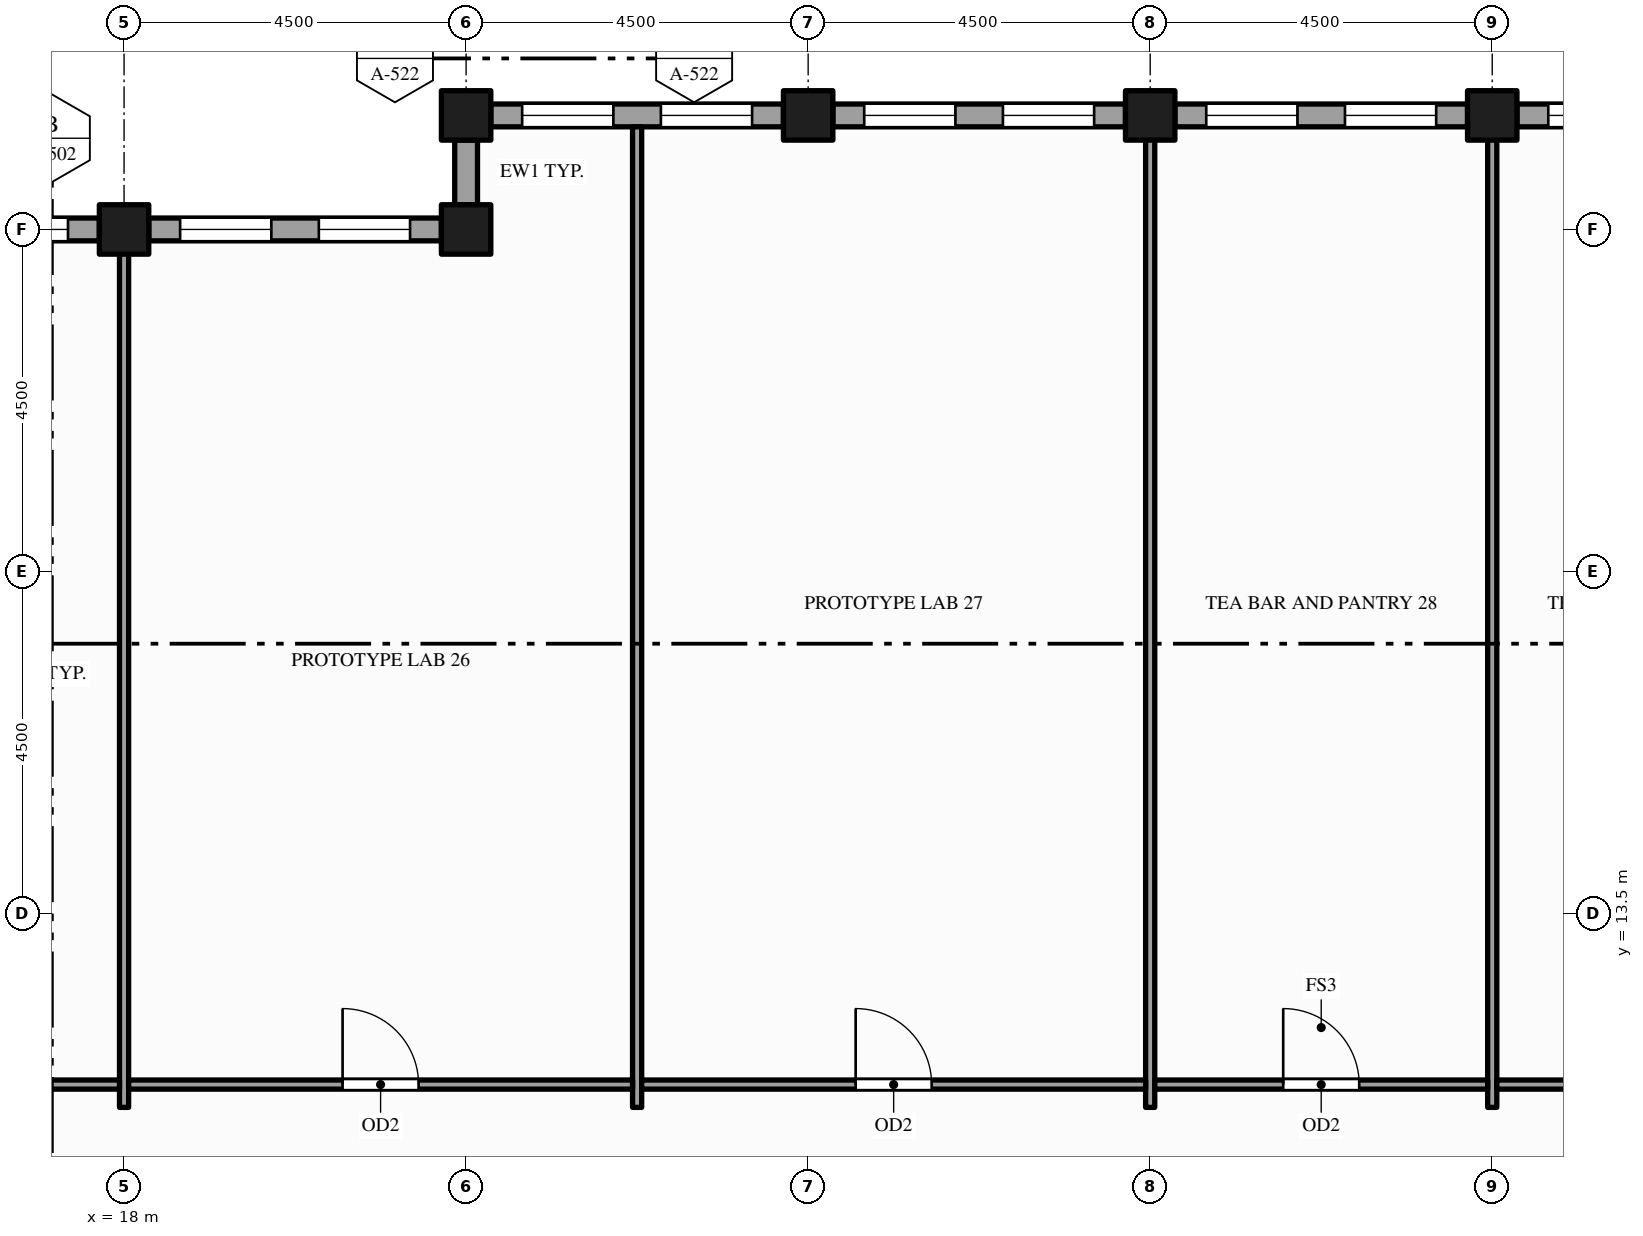
"""IFC4 building model, lengths in metres.
Left out: names, types, materials, properties, quantities, classifications, styles, units other than length and angle.
Written with IfcOpenShell. Run it as: python <this file> out.ifc"""

import sys

from ifc_helpers import new_model, si_unit, direction, frame, frame_2d, origin, origin_2d, place, context, subcontext, project, spatial, rectangle, hollow_rectangle, extrude, element, fill, save


model = new_model("IFC4")
c1 = context("Model", 3, precision=1e-05, world=origin(), true_north=direction((0.0, 1.0)))
c2 = subcontext(c1, "Body", "Model", "MODEL_VIEW")
j1 = project(units=[si_unit("LENGTHUNIT", "METRE"), si_unit("PLANEANGLEUNIT", "RADIAN")], contexts=[c1])
p1 = place(None, origin())
s1 = spatial("IfcSite", under=j1, at=p1, CompositionType="ELEMENT")
p2 = place(p1, origin())
s2 = spatial("IfcBuilding", under=s1, at=p2, CompositionType="ELEMENT")
p3 = place(p2, frame((0.0, 0.0, 249.0)))
s3 = spatial("IfcBuildingStorey", under=s2, at=p3, CompositionType="ELEMENT", Elevation=249.0)
for number, where, z_axis, x_axis in (
    (1, (18.0, 22.5, -0.15), (0.0, 0.0, 1.0), (1.0, 0.0, 0.0)),
    (2, (22.5, 22.5, -0.15), (0.0, 0.0, 1.0), (1.0, 0.0, 0.0)),
    (3, (22.5, 24.0, -0.15), (0.0, 0.0, 1.0), (1.0, 0.0, 0.0)),
    (4, (27.0, 24.0, -0.15), (0.0, 0.0, 1.0), (1.0, 0.0, 0.0)),
    (5, (31.5, 24.0, -0.15), (0.0, 0.0, 1.0), (1.0, 0.0, 0.0)),
    (6, (36.0, 24.0, -0.15), (0.0, 0.0, 1.0), (1.0, 0.0, 0.0)),
):
    element("IfcColumn", number, at=place(p3, frame(where, z_axis=z_axis, x_axis=x_axis)), inside=s3, PredefinedType="COLUMN", context=c2, shape_type="SweptSolid", body=[
        extrude(hollow_rectangle(XDim=0.65, YDim=0.65, WallThickness=0.032, at=origin_2d()), origin(), (0.0, 0.0, 1.0), 4.0),
    ])
p4 = place(p3, frame((40.175, 24.0, 0.0), z_axis=(0.0, 0.0, 1.0), x_axis=(-1.0, 0.0, 0.0)))
e7 = element("IfcWall", 7, at=p4, inside=s3, PredefinedType="STANDARD", context=c2, shape_type="SweptSolid", body=[
    extrude(rectangle(XDim=3.85, YDim=0.3, at=frame_2d((1.925, 0.0))), origin(), (0.0, 0.0, 1.0), 2.87),
])
p5 = place(p4, frame((0.413, 0.0, 0.9)))
e8 = element("IfcOpeningElement", 8, at=p5, cuts=e7, PredefinedType="OPENING", context=c2, shape_type="SweptSolid", body=[
    extrude(rectangle(XDim=1.2, YDim=1.75, at=frame_2d((0.6, 0.875))), frame((0.0, 0.16, 0.0), z_axis=(0.0, -1.0, 0.0), x_axis=(1.0, 0.0, 0.0)), (0.0, 0.0, 1.0), 0.32),
])
p6 = place(p4, frame((2.238, 0.0, 0.9)))
e9 = element("IfcOpeningElement", 9, at=p6, cuts=e7, PredefinedType="OPENING", context=c2, shape_type="SweptSolid", body=[
    extrude(rectangle(XDim=1.2, YDim=1.75, at=frame_2d((0.6, 0.875))), frame((0.0, 0.16, 0.0), z_axis=(0.0, -1.0, 0.0), x_axis=(1.0, 0.0, 0.0)), (0.0, 0.0, 1.0), 0.32),
])
p7 = place(p3, frame((35.675, 24.0, 0.0), z_axis=(0.0, 0.0, 1.0), x_axis=(-1.0, 0.0, 0.0)))
e10 = element("IfcWall", 10, at=p7, inside=s3, PredefinedType="STANDARD", context=c2, shape_type="SweptSolid", body=[
    extrude(rectangle(XDim=3.85, YDim=0.3, at=frame_2d((1.925, 0.0))), origin(), (0.0, 0.0, 1.0), 2.87),
])
p8 = place(p7, frame((0.413, 0.0, 0.9)))
e11 = element("IfcOpeningElement", 11, at=p8, cuts=e10, PredefinedType="OPENING", context=c2, shape_type="SweptSolid", body=[
    extrude(rectangle(XDim=1.2, YDim=1.75, at=frame_2d((0.6, 0.875))), frame((0.0, 0.16, 0.0), z_axis=(0.0, -1.0, 0.0), x_axis=(1.0, 0.0, 0.0)), (0.0, 0.0, 1.0), 0.32),
])
p9 = place(p7, frame((2.238, 0.0, 0.9)))
e12 = element("IfcOpeningElement", 12, at=p9, cuts=e10, PredefinedType="OPENING", context=c2, shape_type="SweptSolid", body=[
    extrude(rectangle(XDim=1.2, YDim=1.75, at=frame_2d((0.6, 0.875))), frame((0.0, 0.16, 0.0), z_axis=(0.0, -1.0, 0.0), x_axis=(1.0, 0.0, 0.0)), (0.0, 0.0, 1.0), 0.32),
])
p10 = place(p3, frame((31.175, 24.0, 0.0), z_axis=(0.0, 0.0, 1.0), x_axis=(-1.0, 0.0, 0.0)))
e13 = element("IfcWall", 13, at=p10, inside=s3, PredefinedType="STANDARD", context=c2, shape_type="SweptSolid", body=[
    extrude(rectangle(XDim=3.85, YDim=0.3, at=frame_2d((1.925, 0.0))), origin(), (0.0, 0.0, 1.0), 2.87),
])
p11 = place(p10, frame((0.413, 0.0, 0.9)))
e14 = element("IfcOpeningElement", 14, at=p11, cuts=e13, PredefinedType="OPENING", context=c2, shape_type="SweptSolid", body=[
    extrude(rectangle(XDim=1.2, YDim=1.75, at=frame_2d((0.6, 0.875))), frame((0.0, 0.16, 0.0), z_axis=(0.0, -1.0, 0.0), x_axis=(1.0, 0.0, 0.0)), (0.0, 0.0, 1.0), 0.32),
])
p12 = place(p10, frame((2.238, 0.0, 0.9)))
e15 = element("IfcOpeningElement", 15, at=p12, cuts=e13, PredefinedType="OPENING", context=c2, shape_type="SweptSolid", body=[
    extrude(rectangle(XDim=1.2, YDim=1.75, at=frame_2d((0.6, 0.875))), frame((0.0, 0.16, 0.0), z_axis=(0.0, -1.0, 0.0), x_axis=(1.0, 0.0, 0.0)), (0.0, 0.0, 1.0), 0.32),
])
p13 = place(p3, frame((26.675, 24.0, 0.0), z_axis=(0.0, 0.0, 1.0), x_axis=(-1.0, 0.0, 0.0)))
e16 = element("IfcWall", 16, at=p13, inside=s3, PredefinedType="STANDARD", context=c2, shape_type="SweptSolid", body=[
    extrude(rectangle(XDim=3.85, YDim=0.3, at=frame_2d((1.925, 0.0))), origin(), (0.0, 0.0, 1.0), 2.87),
])
p14 = place(p13, frame((0.413, 0.0, 0.9)))
e17 = element("IfcOpeningElement", 17, at=p14, cuts=e16, PredefinedType="OPENING", context=c2, shape_type="SweptSolid", body=[
    extrude(rectangle(XDim=1.2, YDim=1.75, at=frame_2d((0.6, 0.875))), frame((0.0, 0.16, 0.0), z_axis=(0.0, -1.0, 0.0), x_axis=(1.0, 0.0, 0.0)), (0.0, 0.0, 1.0), 0.32),
])
p15 = place(p13, frame((2.238, 0.0, 0.9)))
e18 = element("IfcOpeningElement", 18, at=p15, cuts=e16, PredefinedType="OPENING", context=c2, shape_type="SweptSolid", body=[
    extrude(rectangle(XDim=1.2, YDim=1.75, at=frame_2d((0.6, 0.875))), frame((0.0, 0.16, 0.0), z_axis=(0.0, -1.0, 0.0), x_axis=(1.0, 0.0, 0.0)), (0.0, 0.0, 1.0), 0.32),
])
p16 = place(p3, frame((22.5, 23.675, 0.0), z_axis=(0.0, 0.0, 1.0), x_axis=(0.0, -1.0, 0.0)))
e19 = element("IfcWall", 19, at=p16, inside=s3, PredefinedType="STANDARD", context=c2, shape_type="SweptSolid", body=[
    extrude(rectangle(XDim=0.85, YDim=0.3, at=frame_2d((0.425, 0.0))), origin(), (0.0, 0.0, 1.0), 3.162),
])
p17 = place(p3, frame((22.175, 22.5, 0.0), z_axis=(0.0, 0.0, 1.0), x_axis=(-1.0, 0.0, 0.0)))
e20 = element("IfcWall", 20, at=p17, inside=s3, PredefinedType="STANDARD", context=c2, shape_type="SweptSolid", body=[
    extrude(rectangle(XDim=3.85, YDim=0.3, at=frame_2d((1.925, 0.0))), origin(), (0.0, 0.0, 1.0), 2.87),
])
p18 = place(p17, frame((0.413, 0.0, 0.9)))
e21 = element("IfcOpeningElement", 21, at=p18, cuts=e20, PredefinedType="OPENING", context=c2, shape_type="SweptSolid", body=[
    extrude(rectangle(XDim=1.2, YDim=1.75, at=frame_2d((0.6, 0.875))), frame((0.0, 0.16, 0.0), z_axis=(0.0, -1.0, 0.0), x_axis=(1.0, 0.0, 0.0)), (0.0, 0.0, 1.0), 0.32),
])
p19 = place(p17, frame((2.238, 0.0, 0.9)))
e22 = element("IfcOpeningElement", 22, at=p19, cuts=e20, PredefinedType="OPENING", context=c2, shape_type="SweptSolid", body=[
    extrude(rectangle(XDim=1.2, YDim=1.75, at=frame_2d((0.6, 0.875))), frame((0.0, 0.16, 0.0), z_axis=(0.0, -1.0, 0.0), x_axis=(1.0, 0.0, 0.0)), (0.0, 0.0, 1.0), 0.32),
])
p20 = place(p3, frame((17.675, 22.5, 0.0), z_axis=(0.0, 0.0, 1.0), x_axis=(-1.0, 0.0, 0.0)))
e23 = element("IfcWall", 23, at=p20, inside=s3, PredefinedType="STANDARD", context=c2, shape_type="SweptSolid", body=[
    extrude(rectangle(XDim=3.85, YDim=0.3, at=frame_2d((1.925, 0.0))), origin(), (0.0, 0.0, 1.0), 2.87),
])
p21 = place(p20, frame((0.413, 0.0, 0.9)))
e24 = element("IfcOpeningElement", 24, at=p21, cuts=e23, PredefinedType="OPENING", context=c2, shape_type="SweptSolid", body=[
    extrude(rectangle(XDim=1.2, YDim=1.75, at=frame_2d((0.6, 0.875))), frame((0.0, 0.16, 0.0), z_axis=(0.0, -1.0, 0.0), x_axis=(1.0, 0.0, 0.0)), (0.0, 0.0, 1.0), 0.32),
])
p22 = place(p20, frame((2.238, 0.0, 0.9)))
e25 = element("IfcOpeningElement", 25, at=p22, cuts=e23, PredefinedType="OPENING", context=c2, shape_type="SweptSolid", body=[
    extrude(rectangle(XDim=1.2, YDim=1.75, at=frame_2d((0.6, 0.875))), frame((0.0, 0.16, 0.0), z_axis=(0.0, -1.0, 0.0), x_axis=(1.0, 0.0, 0.0)), (0.0, 0.0, 1.0), 0.32),
])
p23 = place(p3, frame((18.0, 10.95, 0.0), z_axis=(0.0, 0.0, 1.0), x_axis=(0.0, 1.0, 0.0)))
e26 = element("IfcWall", 26, at=p23, inside=s3, PredefinedType="PARTITIONING", context=c2, shape_type="SweptSolid", body=[
    extrude(rectangle(XDim=11.4, YDim=0.12, at=frame_2d((5.7, 0.0))), origin(), (0.0, 0.0, 1.0), 2.87),
])
for number, where, z_axis, x_axis in (
    (27, (24.75, 10.95, 0.0), (0.0, 0.0, 1.0), (0.0, 1.0, 0.0)),
    (28, (31.5, 10.95, 0.0), (0.0, 0.0, 1.0), (0.0, 1.0, 0.0)),
    (29, (36.0, 10.95, 0.0), (0.0, 0.0, 1.0), (0.0, 1.0, 0.0)),
):
    element("IfcWall", number, at=place(p3, frame(where, z_axis=z_axis, x_axis=x_axis)), inside=s3, PredefinedType="PARTITIONING", context=c2, shape_type="SweptSolid", body=[
        extrude(rectangle(XDim=12.9, YDim=0.12, at=frame_2d((6.45, 0.0))), origin(), (0.0, 0.0, 1.0), 2.87),
    ])
p24 = place(p3, frame((0.15, 11.25, 0.0), z_axis=(0.0, 0.0, 1.0), x_axis=(1.0, 0.0, 0.0)))
e30 = element("IfcWall", 30, at=p24, inside=s3, PredefinedType="PARTITIONING", context=c2, shape_type="SweptSolid", body=[
    extrude(rectangle(XDim=17.79, YDim=0.12, at=frame_2d((8.895, 0.0))), origin(), (0.0, 0.0, 1.0), 2.87),
])
p25 = place(p24, frame((8.005, 0.0, 0.0)))
e31 = element("IfcOpeningElement", 31, at=p25, cuts=e30, PredefinedType="OPENING", context=c2, shape_type="SweptSolid", body=[
    extrude(rectangle(XDim=1.8, YDim=2.1, at=frame_2d((0.9, 1.05))), frame((0.0, 0.07, 0.0), z_axis=(0.0, -1.0, 0.0), x_axis=(1.0, 0.0, 0.0)), (0.0, 0.0, 1.0), 0.14),
])
p26 = place(p3, frame((18.06, 11.25, 0.0), z_axis=(0.0, 0.0, 1.0), x_axis=(1.0, 0.0, 0.0)))
e32 = element("IfcWall", 32, at=p26, inside=s3, PredefinedType="PARTITIONING", context=c2, shape_type="SweptSolid", body=[
    extrude(rectangle(XDim=6.63, YDim=0.12, at=frame_2d((3.315, 0.0))), origin(), (0.0, 0.0, 1.0), 2.87),
])
p27 = place(p26, frame((2.815, 0.0, 0.0)))
e33 = element("IfcOpeningElement", 33, at=p27, cuts=e32, PredefinedType="OPENING", context=c2, shape_type="SweptSolid", body=[
    extrude(rectangle(XDim=1.0, YDim=2.1, at=frame_2d((0.5, 1.05))), frame((0.0, 0.07, 0.0), z_axis=(0.0, -1.0, 0.0), x_axis=(1.0, 0.0, 0.0)), (0.0, 0.0, 1.0), 0.14),
])
p28 = place(p3, frame((24.81, 11.25, 0.0), z_axis=(0.0, 0.0, 1.0), x_axis=(1.0, 0.0, 0.0)))
e34 = element("IfcWall", 34, at=p28, inside=s3, PredefinedType="PARTITIONING", context=c2, shape_type="SweptSolid", body=[
    extrude(rectangle(XDim=6.63, YDim=0.12, at=frame_2d((3.315, 0.0))), origin(), (0.0, 0.0, 1.0), 2.87),
])
p29 = place(p28, frame((2.815, 0.0, 0.0)))
e35 = element("IfcOpeningElement", 35, at=p29, cuts=e34, PredefinedType="OPENING", context=c2, shape_type="SweptSolid", body=[
    extrude(rectangle(XDim=1.0, YDim=2.1, at=frame_2d((0.5, 1.05))), frame((0.0, 0.07, 0.0), z_axis=(0.0, -1.0, 0.0), x_axis=(1.0, 0.0, 0.0)), (0.0, 0.0, 1.0), 0.14),
])
p30 = place(p3, frame((31.56, 11.25, 0.0), z_axis=(0.0, 0.0, 1.0), x_axis=(1.0, 0.0, 0.0)))
e36 = element("IfcWall", 36, at=p30, inside=s3, PredefinedType="PARTITIONING", context=c2, shape_type="SweptSolid", body=[
    extrude(rectangle(XDim=4.38, YDim=0.12, at=frame_2d((2.19, 0.0))), origin(), (0.0, 0.0, 1.0), 2.87),
])
p31 = place(p30, frame((1.69, 0.0, 0.0)))
e37 = element("IfcOpeningElement", 37, at=p31, cuts=e36, PredefinedType="OPENING", context=c2, shape_type="SweptSolid", body=[
    extrude(rectangle(XDim=1.0, YDim=2.1, at=frame_2d((0.5, 1.05))), frame((0.0, 0.07, 0.0), z_axis=(0.0, -1.0, 0.0), x_axis=(1.0, 0.0, 0.0)), (0.0, 0.0, 1.0), 0.14),
])
p32 = place(p3, frame((36.06, 11.25, 0.0), z_axis=(0.0, 0.0, 1.0), x_axis=(1.0, 0.0, 0.0)))
e38 = element("IfcWall", 38, at=p32, inside=s3, PredefinedType="PARTITIONING", context=c2, shape_type="SweptSolid", body=[
    extrude(rectangle(XDim=4.38, YDim=0.12, at=frame_2d((2.19, 0.0))), origin(), (0.0, 0.0, 1.0), 2.87),
])
p33 = place(p32, frame((1.69, 0.0, 0.0)))
e39 = element("IfcOpeningElement", 39, at=p33, cuts=e38, PredefinedType="OPENING", context=c2, shape_type="SweptSolid", body=[
    extrude(rectangle(XDim=1.0, YDim=2.1, at=frame_2d((0.5, 1.05))), frame((0.0, 0.07, 0.0), z_axis=(0.0, -1.0, 0.0), x_axis=(1.0, 0.0, 0.0)), (0.0, 0.0, 1.0), 0.14),
])
p34 = place(p6, origin())
e40 = element("IfcWindow", 40, at=p34, inside=s3, PartitioningType="SINGLE_PANEL", PredefinedType="WINDOW", context=c2, shape_type="SweptSolid", body=[
    extrude(rectangle(XDim=1.2, YDim=1.75, at=frame_2d((0.6, 0.875))), frame((0.0, 0.03, 0.0), z_axis=(0.0, -1.0, 0.0), x_axis=(1.0, 0.0, 0.0)), (0.0, 0.0, 1.0), 0.06),
])
fill(e9, e40)
p35 = place(p8, origin())
e41 = element("IfcWindow", 41, at=p35, inside=s3, PartitioningType="SINGLE_PANEL", PredefinedType="WINDOW", context=c2, shape_type="SweptSolid", body=[
    extrude(rectangle(XDim=1.2, YDim=1.75, at=frame_2d((0.6, 0.875))), frame((0.0, 0.03, 0.0), z_axis=(0.0, -1.0, 0.0), x_axis=(1.0, 0.0, 0.0)), (0.0, 0.0, 1.0), 0.06),
])
fill(e11, e41)
p36 = place(p9, origin())
e42 = element("IfcWindow", 42, at=p36, inside=s3, PartitioningType="SINGLE_PANEL", PredefinedType="WINDOW", context=c2, shape_type="SweptSolid", body=[
    extrude(rectangle(XDim=1.2, YDim=1.75, at=frame_2d((0.6, 0.875))), frame((0.0, 0.03, 0.0), z_axis=(0.0, -1.0, 0.0), x_axis=(1.0, 0.0, 0.0)), (0.0, 0.0, 1.0), 0.06),
])
fill(e12, e42)
p37 = place(p11, origin())
e43 = element("IfcWindow", 43, at=p37, inside=s3, PartitioningType="SINGLE_PANEL", PredefinedType="WINDOW", context=c2, shape_type="SweptSolid", body=[
    extrude(rectangle(XDim=1.2, YDim=1.75, at=frame_2d((0.6, 0.875))), frame((0.0, 0.03, 0.0), z_axis=(0.0, -1.0, 0.0), x_axis=(1.0, 0.0, 0.0)), (0.0, 0.0, 1.0), 0.06),
])
fill(e14, e43)
p38 = place(p12, origin())
e44 = element("IfcWindow", 44, at=p38, inside=s3, PartitioningType="SINGLE_PANEL", PredefinedType="WINDOW", context=c2, shape_type="SweptSolid", body=[
    extrude(rectangle(XDim=1.2, YDim=1.75, at=frame_2d((0.6, 0.875))), frame((0.0, 0.03, 0.0), z_axis=(0.0, -1.0, 0.0), x_axis=(1.0, 0.0, 0.0)), (0.0, 0.0, 1.0), 0.06),
])
fill(e15, e44)
p39 = place(p14, origin())
e45 = element("IfcWindow", 45, at=p39, inside=s3, PartitioningType="SINGLE_PANEL", PredefinedType="WINDOW", context=c2, shape_type="SweptSolid", body=[
    extrude(rectangle(XDim=1.2, YDim=1.75, at=frame_2d((0.6, 0.875))), frame((0.0, 0.03, 0.0), z_axis=(0.0, -1.0, 0.0), x_axis=(1.0, 0.0, 0.0)), (0.0, 0.0, 1.0), 0.06),
])
fill(e17, e45)
p40 = place(p15, origin())
e46 = element("IfcWindow", 46, at=p40, inside=s3, PartitioningType="SINGLE_PANEL", PredefinedType="WINDOW", context=c2, shape_type="SweptSolid", body=[
    extrude(rectangle(XDim=1.2, YDim=1.75, at=frame_2d((0.6, 0.875))), frame((0.0, 0.03, 0.0), z_axis=(0.0, -1.0, 0.0), x_axis=(1.0, 0.0, 0.0)), (0.0, 0.0, 1.0), 0.06),
])
fill(e18, e46)
p41 = place(p18, origin())
e47 = element("IfcWindow", 47, at=p41, inside=s3, PartitioningType="SINGLE_PANEL", PredefinedType="WINDOW", context=c2, shape_type="SweptSolid", body=[
    extrude(rectangle(XDim=1.2, YDim=1.75, at=frame_2d((0.6, 0.875))), frame((0.0, 0.03, 0.0), z_axis=(0.0, -1.0, 0.0), x_axis=(1.0, 0.0, 0.0)), (0.0, 0.0, 1.0), 0.06),
])
fill(e21, e47)
p42 = place(p19, origin())
e48 = element("IfcWindow", 48, at=p42, inside=s3, PartitioningType="SINGLE_PANEL", PredefinedType="WINDOW", context=c2, shape_type="SweptSolid", body=[
    extrude(rectangle(XDim=1.2, YDim=1.75, at=frame_2d((0.6, 0.875))), frame((0.0, 0.03, 0.0), z_axis=(0.0, -1.0, 0.0), x_axis=(1.0, 0.0, 0.0)), (0.0, 0.0, 1.0), 0.06),
])
fill(e22, e48)
p43 = place(p21, origin())
e49 = element("IfcWindow", 49, at=p43, inside=s3, PartitioningType="SINGLE_PANEL", PredefinedType="WINDOW", context=c2, shape_type="SweptSolid", body=[
    extrude(rectangle(XDim=1.2, YDim=1.75, at=frame_2d((0.6, 0.875))), frame((0.0, 0.03, 0.0), z_axis=(0.0, -1.0, 0.0), x_axis=(1.0, 0.0, 0.0)), (0.0, 0.0, 1.0), 0.06),
])
fill(e24, e49)
p44 = place(p27, origin())
e50 = element("IfcDoor", 50, at=p44, inside=s3, OperationType="SINGLE_SWING_LEFT", PredefinedType="DOOR", context=c2, shape_type="SweptSolid", body=[
    extrude(rectangle(XDim=1.0, YDim=2.1, at=frame_2d((0.5, 1.05))), frame((0.0, 0.025, 0.0), z_axis=(0.0, -1.0, 0.0), x_axis=(1.0, 0.0, 0.0)), (0.0, 0.0, 1.0), 0.05),
])
fill(e33, e50)
p45 = place(p29, origin())
e51 = element("IfcDoor", 51, at=p45, inside=s3, OperationType="SINGLE_SWING_LEFT", PredefinedType="DOOR", context=c2, shape_type="SweptSolid", body=[
    extrude(rectangle(XDim=1.0, YDim=2.1, at=frame_2d((0.5, 1.05))), frame((0.0, 0.025, 0.0), z_axis=(0.0, -1.0, 0.0), x_axis=(1.0, 0.0, 0.0)), (0.0, 0.0, 1.0), 0.05),
])
fill(e35, e51)
p46 = place(p31, origin())
e52 = element("IfcDoor", 52, at=p46, inside=s3, OperationType="SINGLE_SWING_LEFT", PredefinedType="DOOR", context=c2, shape_type="SweptSolid", body=[
    extrude(rectangle(XDim=1.0, YDim=2.1, at=frame_2d((0.5, 1.05))), frame((0.0, 0.025, 0.0), z_axis=(0.0, -1.0, 0.0), x_axis=(1.0, 0.0, 0.0)), (0.0, 0.0, 1.0), 0.05),
])
fill(e37, e52)
save(model, sys.argv[1])
